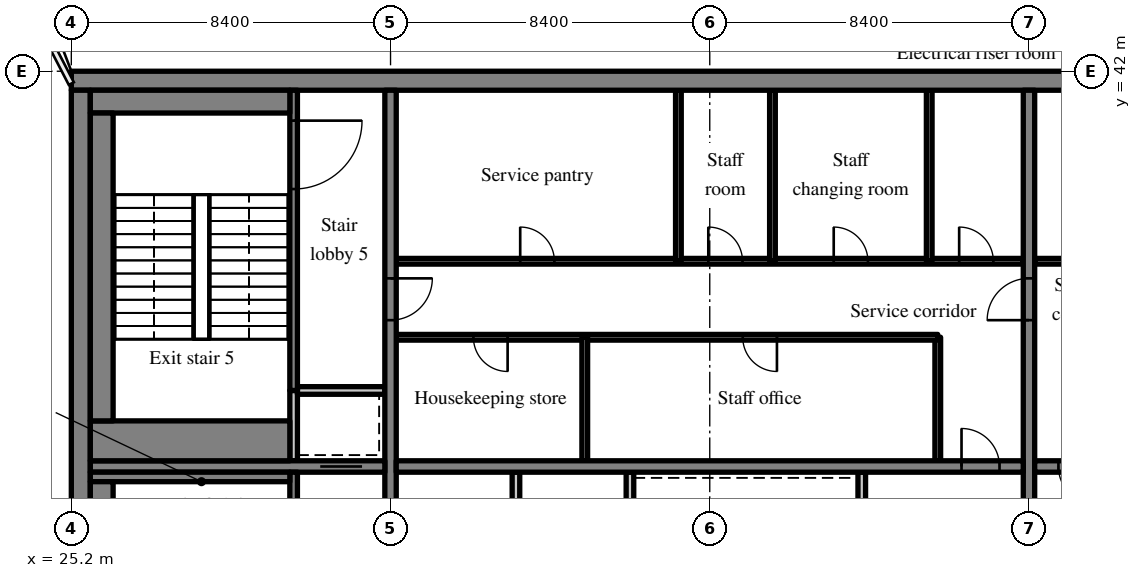
"""IFC4 building model, lengths in metres.
Left out: names, types, materials, properties, quantities, classifications, styles, units other than length and angle.
Written with IfcOpenShell. Run it as: python <this file> out.ifc"""

import sys

from ifc_helpers import new_model, si_unit, direction, frame, frame_2d, origin, place, context, subcontext, project, spatial, rectangle, extrude, source, transform, mapped, element, fill, save


model = new_model("IFC4")
c1 = context("Model", 3, precision=1e-05, world=origin(), true_north=direction((0.0, 1.0)))
c2 = subcontext(c1, "Body", "Model", "MODEL_VIEW")
j1 = project(units=[si_unit("LENGTHUNIT", "METRE"), si_unit("PLANEANGLEUNIT", "RADIAN")], contexts=[c1])
p1 = place(None, origin())
s1 = spatial("IfcSite", under=j1, at=p1, CompositionType="ELEMENT")
p2 = place(p1, origin())
s2 = spatial("IfcBuilding", under=s1, at=p2, CompositionType="ELEMENT")
p3 = place(p2, frame((0.0, 0.0, 323.7)))
s3 = spatial("IfcBuildingStorey", under=s2, at=p3, CompositionType="ELEMENT", Elevation=323.7)
m1 = source(origin(), c2, "Body", "SweptSolid", [
    extrude(rectangle(XDim=50.4, YDim=0.5, at=frame_2d((25.2, 0.0))), origin(), (0.0, 0.0, 1.0), 5.72),
])
p4 = place(p3, frame((25.2, 41.75, 0.0), z_axis=(0.0, 0.0, 1.0), x_axis=(1.0, 0.0, 0.0)))
e1 = element("IfcWall", 1, at=p4, inside=s3, PredefinedType="SHEAR", context=c2, shape_type="MappedRepresentation", body=[
    mapped(m1, transform((0.0, 0.0, 0.0), scale=1.0)),
])
m2 = source(origin(), c2, "Body", "SweptSolid", [
    extrude(rectangle(XDim=19.0, YDim=0.5, at=frame_2d((9.5, 0.0))), origin(), (0.0, 0.0, 1.0), 5.72),
])
p5 = place(p3, frame((25.45, 22.5, 0.0), z_axis=(0.0, 0.0, 1.0), x_axis=(0.0, 1.0, 0.0)))
e2 = element("IfcWall", 2, at=p5, inside=s3, PredefinedType="SHEAR", context=c2, shape_type="MappedRepresentation", body=[
    mapped(m2, transform((0.0, 0.0, 0.0), scale=1.0)),
])
m3 = source(origin(), c2, "Body", "SweptSolid", [
    extrude(rectangle(XDim=19.0, YDim=0.3, at=frame_2d((9.5, 0.0))), origin(), (0.0, 0.0, 1.0), 5.72),
])
p6 = place(p3, frame((33.6, 22.5, 0.0), z_axis=(0.0, 0.0, 1.0), x_axis=(0.0, 1.0, 0.0)))
e3 = element("IfcWall", 3, at=p6, inside=s3, PredefinedType="SHEAR", context=c2, shape_type="MappedRepresentation", body=[
    mapped(m3, transform((0.0, 0.0, 0.0), scale=1.0)),
])
m4 = source(origin(), c2, "Body", "SweptSolid", [
    extrude(rectangle(XDim=1.1, YDim=2.1, at=frame_2d((0.55, 1.05))), frame((0.0, 0.16, 0.0), z_axis=(0.0, -1.0, 0.0), x_axis=(1.0, 0.0, 0.0)), (0.0, 0.0, 1.0), 0.32),
])
p7 = place(p6, frame((12.95, 0.0, 0.0)))
e4 = element("IfcOpeningElement", 4, at=p7, cuts=e3, PredefinedType="OPENING", context=c2, shape_type="MappedRepresentation", body=[
    mapped(m4, transform((0.0, 0.0, 0.0), scale=1.0)),
])
p8 = place(p3, frame((50.4, 22.5, 0.0), z_axis=(0.0, 0.0, 1.0), x_axis=(0.0, 1.0, 0.0)))
e5 = element("IfcWall", 5, at=p8, inside=s3, PredefinedType="SHEAR", context=c2, shape_type="MappedRepresentation", body=[
    mapped(m3, transform((0.0, 0.0, 0.0), scale=1.0)),
])
p9 = place(p8, frame((12.95, 0.0, 0.0)))
e6 = element("IfcOpeningElement", 6, at=p9, cuts=e5, PredefinedType="OPENING", context=c2, shape_type="MappedRepresentation", body=[
    mapped(m4, transform((0.0, 0.0, 0.0), scale=1.0)),
])
m5 = source(origin(), c2, "Body", "SweptSolid", [
    extrude(rectangle(XDim=7.75, YDim=0.3, at=frame_2d((3.875, 0.0))), origin(), (0.0, 0.0, 1.0), 5.72),
])
p10 = place(p3, frame((25.7, 31.6, 0.0), z_axis=(0.0, 0.0, 1.0), x_axis=(1.0, 0.0, 0.0)))
e7 = element("IfcWall", 7, at=p10, inside=s3, PredefinedType="SHEAR", context=c2, shape_type="MappedRepresentation", body=[
    mapped(m5, transform((0.0, 0.0, 0.0), scale=1.0)),
])
p11 = place(p10, frame((6.05, 0.0, 0.0)))
e8 = element("IfcOpeningElement", 8, at=p11, cuts=e7, PredefinedType="OPENING", context=c2, shape_type="MappedRepresentation", body=[
    mapped(m4, transform((0.0, 0.0, 0.0), scale=1.0)),
])
m6 = source(origin(), c2, "Body", "SweptSolid", [
    extrude(rectangle(XDim=16.5, YDim=0.3, at=frame_2d((8.25, 0.0))), origin(), (0.0, 0.0, 1.0), 5.72),
])
p12 = place(p3, frame((33.75, 31.6, 0.0), z_axis=(0.0, 0.0, 1.0), x_axis=(1.0, 0.0, 0.0)))
e9 = element("IfcWall", 9, at=p12, inside=s3, PredefinedType="SHEAR", context=c2, shape_type="MappedRepresentation", body=[
    mapped(m6, transform((0.0, 0.0, 0.0), scale=1.0)),
])
m7 = source(origin(), c2, "Body", "SweptSolid", [
    extrude(rectangle(XDim=1.0, YDim=2.1, at=frame_2d((0.5, 1.05))), frame((0.0, 0.16, 0.0), z_axis=(0.0, -1.0, 0.0), x_axis=(1.0, 0.0, 0.0)), (0.0, 0.0, 1.0), 0.32),
])
p13 = place(p12, frame((14.875, 0.0, 0.0)))
e10 = element("IfcOpeningElement", 10, at=p13, cuts=e9, PredefinedType="OPENING", context=c2, shape_type="MappedRepresentation", body=[
    mapped(m7, transform((0.0, 0.0, 0.0), scale=1.0)),
])
p14 = place(p3, frame((50.55, 31.6, 0.0), z_axis=(0.0, 0.0, 1.0), x_axis=(1.0, 0.0, 0.0)))
e11 = element("IfcWall", 11, at=p14, inside=s3, PredefinedType="SHEAR", context=c2, shape_type="MappedRepresentation", body=[
    mapped(m6, transform((0.0, 0.0, 0.0), scale=1.0)),
])
p15 = place(p14, frame((0.625, 0.0, 0.0)))
e12 = element("IfcOpeningElement", 12, at=p15, cuts=e11, PredefinedType="OPENING", context=c2, shape_type="MappedRepresentation", body=[
    mapped(m7, transform((0.0, 0.0, 0.0), scale=1.0)),
])
m8 = source(origin(), c2, "Body", "SweptSolid", [
    extrude(rectangle(XDim=8.95, YDim=0.2, at=frame_2d((4.475, 0.0))), origin(), (0.0, 0.0, 1.0), 5.72),
])
p16 = place(p3, frame((39.9, 22.5, 0.0), z_axis=(0.0, 0.0, 1.0), x_axis=(0.0, 1.0, 0.0)))
e13 = element("IfcWall", 13, at=p16, inside=s3, PredefinedType="PARTITIONING", context=c2, shape_type="MappedRepresentation", body=[
    mapped(m8, transform((0.0, 0.0, 0.0), scale=1.0)),
])
m9 = source(origin(), c2, "Body", "SweptSolid", [
    extrude(rectangle(XDim=0.9, YDim=2.1, at=frame_2d((0.45, 1.05))), frame((0.0, 0.11, 0.0), z_axis=(0.0, -1.0, 0.0), x_axis=(1.0, 0.0, 0.0)), (0.0, 0.0, 1.0), 0.22),
])
p17 = place(p16, frame((4.05, 0.0, 0.0)))
e14 = element("IfcOpeningElement", 14, at=p17, cuts=e13, PredefinedType="OPENING", context=c2, shape_type="MappedRepresentation", body=[
    mapped(m9, transform((0.0, 0.0, 0.0), scale=1.0)),
])
m10 = source(origin(), c2, "Body", "SweptSolid", [
    extrude(rectangle(XDim=2.65, YDim=0.2, at=frame_2d((1.325, 0.0))), origin(), (0.0, 0.0, 1.0), 5.72),
])
p18 = place(p3, frame((46.0, 28.8, 0.0), z_axis=(0.0, 0.0, 1.0), x_axis=(0.0, 1.0, 0.0)))
e15 = element("IfcWall", 15, at=p18, inside=s3, PredefinedType="SOLIDWALL", context=c2, shape_type="MappedRepresentation", body=[
    mapped(m10, transform((0.0, 0.0, 0.0), scale=1.0)),
])
p19 = place(p3, frame((36.9, 22.5, 0.0), z_axis=(0.0, 0.0, 1.0), x_axis=(0.0, 1.0, 0.0)))
e16 = element("IfcWall", 16, at=p19, inside=s3, PredefinedType="PARTITIONING", context=c2, shape_type="MappedRepresentation", body=[
    mapped(m8, transform((0.0, 0.0, 0.0), scale=1.0)),
])
m11 = source(origin(), c2, "Body", "SweptSolid", [
    extrude(rectangle(XDim=3.25, YDim=0.15, at=frame_2d((1.625, 0.0))), origin(), (0.0, 0.0, 1.0), 5.72),
])
p20 = place(p3, frame((48.0, 31.75, 0.0), z_axis=(0.0, 0.0, 1.0), x_axis=(0.0, 1.0, 0.0)))
e17 = element("IfcWall", 17, at=p20, inside=s3, PredefinedType="PARTITIONING", context=c2, shape_type="MappedRepresentation", body=[
    mapped(m11, transform((0.0, 0.0, 0.0), scale=1.0)),
])
m12 = source(origin(), c2, "Body", "SweptSolid", [
    extrude(rectangle(XDim=14.25, YDim=0.15, at=frame_2d((7.125, 0.0))), origin(), (0.0, 0.0, 1.0), 5.72),
])
p21 = place(p3, frame((33.75, 35.0, 0.0), z_axis=(0.0, 0.0, 1.0), x_axis=(1.0, 0.0, 0.0)))
e18 = element("IfcWall", 18, at=p21, inside=s3, PredefinedType="PARTITIONING", context=c2, shape_type="MappedRepresentation", body=[
    mapped(m12, transform((0.0, 0.0, 0.0), scale=1.0)),
])
m13 = source(origin(), c2, "Body", "SweptSolid", [
    extrude(rectangle(XDim=0.9, YDim=2.1, at=frame_2d((0.45, 1.05))), frame((0.0, 0.085, 0.0), z_axis=(0.0, -1.0, 0.0), x_axis=(1.0, 0.0, 0.0)), (0.0, 0.0, 1.0), 0.17),
])
p22 = place(p21, frame((2.031, 0.0, 0.0)))
e19 = element("IfcOpeningElement", 19, at=p22, cuts=e18, PredefinedType="OPENING", context=c2, shape_type="MappedRepresentation", body=[
    mapped(m13, transform((0.0, 0.0, 0.0), scale=1.0)),
])
p23 = place(p21, frame((9.118, 0.0, 0.0)))
e20 = element("IfcOpeningElement", 20, at=p23, cuts=e18, PredefinedType="OPENING", context=c2, shape_type="MappedRepresentation", body=[
    mapped(m13, transform((0.0, 0.0, 0.0), scale=1.0)),
])
m14 = source(origin(), c2, "Body", "SweptSolid", [
    extrude(rectangle(XDim=16.5, YDim=0.15, at=frame_2d((8.25, 0.0))), origin(), (0.0, 0.0, 1.0), 5.72),
])
p24 = place(p3, frame((33.75, 37.0, 0.0), z_axis=(0.0, 0.0, 1.0), x_axis=(1.0, 0.0, 0.0)))
e21 = element("IfcWall", 21, at=p24, inside=s3, PredefinedType="PARTITIONING", context=c2, shape_type="MappedRepresentation", body=[
    mapped(m14, transform((0.0, 0.0, 0.0), scale=1.0)),
])
p25 = place(p24, frame((3.262, 0.0, 0.0)))
e22 = element("IfcOpeningElement", 22, at=p25, cuts=e21, PredefinedType="OPENING", context=c2, shape_type="MappedRepresentation", body=[
    mapped(m13, transform((0.0, 0.0, 0.0), scale=1.0)),
])
p26 = place(p24, frame((8.212, 0.0, 0.0)))
e23 = element("IfcOpeningElement", 23, at=p26, cuts=e21, PredefinedType="OPENING", context=c2, shape_type="MappedRepresentation", body=[
    mapped(m13, transform((0.0, 0.0, 0.0), scale=1.0)),
])
p27 = place(p24, frame((11.512, 0.0, 0.0)))
e24 = element("IfcOpeningElement", 24, at=p27, cuts=e21, PredefinedType="OPENING", context=c2, shape_type="MappedRepresentation", body=[
    mapped(m13, transform((0.0, 0.0, 0.0), scale=1.0)),
])
p28 = place(p24, frame((14.813, 0.0, 0.0)))
e25 = element("IfcOpeningElement", 25, at=p28, cuts=e21, PredefinedType="OPENING", context=c2, shape_type="MappedRepresentation", body=[
    mapped(m13, transform((0.0, 0.0, 0.0), scale=1.0)),
])
p29 = place(p3, frame((38.711, 31.75, 0.0), z_axis=(0.0, 0.0, 1.0), x_axis=(0.0, 1.0, 0.0)))
e26 = element("IfcWall", 26, at=p29, inside=s3, PredefinedType="PARTITIONING", context=c2, shape_type="MappedRepresentation", body=[
    mapped(m11, transform((0.0, 0.0, 0.0), scale=1.0)),
])
m15 = source(origin(), c2, "Body", "SweptSolid", [
    extrude(rectangle(XDim=4.5, YDim=0.15, at=frame_2d((2.25, 0.0))), origin(), (0.0, 0.0, 1.0), 5.72),
])
for number, where, z_axis, x_axis in (
    (27, (41.175, 37.0, 0.0), (0.0, 0.0, 1.0), (0.0, 1.0, 0.0)),
    (28, (43.65, 37.0, 0.0), (0.0, 0.0, 1.0), (0.0, 1.0, 0.0)),
    (29, (47.775, 37.0, 0.0), (0.0, 0.0, 1.0), (0.0, 1.0, 0.0)),
):
    element("IfcWall", number, at=place(p3, frame(where, z_axis=z_axis, x_axis=x_axis)), inside=s3, PredefinedType="PARTITIONING", context=c2, shape_type="MappedRepresentation", body=[
        mapped(m15, transform((0.0, 0.0, 0.0), scale=1.0)),
    ])
p30 = place(p3, frame((67.05, 37.0, 0.0), z_axis=(0.0, 0.0, 1.0), x_axis=(-1.0, 0.0, 0.0)))
e30 = element("IfcWall", 30, at=p30, inside=s3, PredefinedType="PARTITIONING", context=c2, shape_type="MappedRepresentation", body=[
    mapped(m14, transform((0.0, 0.0, 0.0), scale=1.0)),
])
p31 = place(p30, frame((0.788, 0.0, 0.0)))
e31 = element("IfcOpeningElement", 31, at=p31, cuts=e30, PredefinedType="OPENING", context=c2, shape_type="MappedRepresentation", body=[
    mapped(m13, transform((0.0, 0.0, 0.0), scale=1.0)),
])
p32 = place(p30, frame((3.675, 0.0, 0.0)))
e32 = element("IfcOpeningElement", 32, at=p32, cuts=e30, PredefinedType="OPENING", context=c2, shape_type="MappedRepresentation", body=[
    mapped(m13, transform((0.0, 0.0, 0.0), scale=1.0)),
])
p33 = place(p30, frame((9.45, 0.0, 0.0)))
e33 = element("IfcOpeningElement", 33, at=p33, cuts=e30, PredefinedType="OPENING", context=c2, shape_type="MappedRepresentation", body=[
    mapped(m13, transform((0.0, 0.0, 0.0), scale=1.0)),
])
p34 = place(p30, frame((14.813, 0.0, 0.0)))
e34 = element("IfcOpeningElement", 34, at=p34, cuts=e30, PredefinedType="OPENING", context=c2, shape_type="MappedRepresentation", body=[
    mapped(m13, transform((0.0, 0.0, 0.0), scale=1.0)),
])
m16 = source(origin(), c2, "Body", "SweptSolid", [
    extrude(rectangle(XDim=8.95, YDim=0.2, at=frame_2d((4.475, 0.0))), origin(), (0.0, 0.0, 1.0), 5.72),
])
p35 = place(p3, frame((31.05, 22.5, 0.0), z_axis=(0.0, 0.0, 1.0), x_axis=(0.0, 1.0, 0.0)))
e35 = element("IfcWall", 35, at=p35, inside=s3, PredefinedType="SOLIDWALL", context=c2, shape_type="MappedRepresentation", body=[
    mapped(m16, transform((0.0, 0.0, 0.0), scale=1.0)),
])
m17 = source(origin(), c2, "Body", "SweptSolid", [
    extrude(rectangle(XDim=1.2, YDim=2.1, at=frame_2d((0.6, 1.05))), frame((0.0, 0.11, 0.0), z_axis=(0.0, -1.0, 0.0), x_axis=(1.0, 0.0, 0.0)), (0.0, 0.0, 1.0), 0.22),
])
p36 = place(p35, frame((7.0, 0.0, 0.0)))
e36 = element("IfcOpeningElement", 36, at=p36, cuts=e35, PredefinedType="OPENING", context=c2, shape_type="MappedRepresentation", body=[
    mapped(m17, transform((0.0, 0.0, 0.0), scale=1.0)),
])
m18 = source(origin(), c2, "Body", "SweptSolid", [
    extrude(rectangle(XDim=1.85, YDim=0.2, at=frame_2d((0.925, 0.0))), origin(), (0.0, 0.0, 1.0), 5.72),
])
p37 = place(p3, frame((31.05, 31.75, 0.0), z_axis=(0.0, 0.0, 1.0), x_axis=(0.0, 1.0, 0.0)))
e37 = element("IfcWall", 37, at=p37, inside=s3, PredefinedType="SOLIDWALL", context=c2, shape_type="MappedRepresentation", body=[
    mapped(m18, transform((0.0, 0.0, 0.0), scale=1.0)),
])
m19 = source(origin(), c2, "Body", "SweptSolid", [
    extrude(rectangle(XDim=2.3, YDim=0.2, at=frame_2d((1.15, 0.0))), origin(), (0.0, 0.0, 1.0), 5.72),
])
p38 = place(p3, frame((31.15, 33.6, 0.0), z_axis=(0.0, 0.0, 1.0), x_axis=(1.0, 0.0, 0.0)))
e38 = element("IfcWall", 38, at=p38, inside=s3, PredefinedType="SOLIDWALL", context=c2, shape_type="MappedRepresentation", body=[
    mapped(m19, transform((0.0, 0.0, 0.0), scale=1.0)),
])
m20 = source(origin(), c2, "Body", "SweptSolid", [
    extrude(rectangle(XDim=7.9, YDim=0.2, at=frame_2d((3.95, 0.0))), origin(), (0.0, 0.0, 1.0), 5.72),
])
p39 = place(p3, frame((31.05, 33.6, 0.0), z_axis=(0.0, 0.0, 1.0), x_axis=(0.0, 1.0, 0.0)))
e39 = element("IfcWall", 39, at=p39, inside=s3, PredefinedType="SOLIDWALL", context=c2, shape_type="MappedRepresentation", body=[
    mapped(m20, transform((0.0, 0.0, 0.0), scale=1.0)),
])
m21 = source(origin(), c2, "Body", "SweptSolid", [
    extrude(rectangle(XDim=1.8, YDim=2.1, at=frame_2d((0.9, 1.05))), frame((0.0, 0.11, 0.0), z_axis=(0.0, -1.0, 0.0), x_axis=(1.0, 0.0, 0.0)), (0.0, 0.0, 1.0), 0.22),
])
p40 = place(p39, frame((5.3, 0.0, 0.0)))
e40 = element("IfcOpeningElement", 40, at=p40, cuts=e39, PredefinedType="OPENING", context=c2, shape_type="MappedRepresentation", body=[
    mapped(m21, transform((0.0, 0.0, 0.0), scale=1.0)),
])
m22 = source(origin(), c2, "Body", "SweptSolid", [
    extrude(rectangle(XDim=5.25, YDim=0.25, at=frame_2d((2.625, 0.0))), origin(), (0.0, 0.0, 1.0), 5.72),
])
p41 = place(p3, frame((25.7, 31.325, 0.0), z_axis=(0.0, 0.0, 1.0), x_axis=(1.0, 0.0, 0.0)))
e41 = element("IfcWall", 41, at=p41, inside=s3, PredefinedType="SOLIDWALL", context=c2, shape_type="MappedRepresentation", body=[
    mapped(m22, transform((0.0, 0.0, 0.0), scale=1.0)),
])
m23 = source(origin(), c2, "Body", "SweptSolid", [
    extrude(rectangle(XDim=8.1, YDim=0.6, at=frame_2d((4.05, 0.0))), origin(), (0.0, 0.0, 1.0), 5.72),
])
p42 = place(p3, frame((26.0, 23.1, 0.0), z_axis=(0.0, 0.0, 1.0), x_axis=(0.0, 1.0, 0.0)))
e42 = element("IfcWall", 42, at=p42, inside=s3, PredefinedType="SOLIDWALL", context=c2, shape_type="MappedRepresentation", body=[
    mapped(m23, transform((0.0, 0.0, 0.0), scale=1.0)),
])
m24 = source(origin(), c2, "Body", "SweptSolid", [
    extrude(rectangle(XDim=5.25, YDim=0.6, at=frame_2d((2.625, 0.0))), origin(), (0.0, 0.0, 1.0), 5.72),
])
p43 = place(p3, frame((25.7, 41.2, 0.0), z_axis=(0.0, 0.0, 1.0), x_axis=(1.0, 0.0, 0.0)))
e43 = element("IfcWall", 43, at=p43, inside=s3, PredefinedType="SOLIDWALL", context=c2, shape_type="MappedRepresentation", body=[
    mapped(m24, transform((0.0, 0.0, 0.0), scale=1.0)),
])
m25 = source(origin(), c2, "Body", "SweptSolid", [
    extrude(rectangle(XDim=5.25, YDim=1.05, at=frame_2d((2.625, 0.0))), origin(), (0.0, 0.0, 1.0), 5.72),
])
p44 = place(p3, frame((25.7, 32.275, 0.0), z_axis=(0.0, 0.0, 1.0), x_axis=(1.0, 0.0, 0.0)))
e44 = element("IfcWall", 44, at=p44, inside=s3, PredefinedType="SOLIDWALL", context=c2, shape_type="MappedRepresentation", body=[
    mapped(m25, transform((0.0, 0.0, 0.0), scale=1.0)),
])
p45 = place(p3, frame((26.0, 32.8, 0.0), z_axis=(0.0, 0.0, 1.0), x_axis=(0.0, 1.0, 0.0)))
e45 = element("IfcWall", 45, at=p45, inside=s3, PredefinedType="SOLIDWALL", context=c2, shape_type="MappedRepresentation", body=[
    mapped(m23, transform((0.0, 0.0, 0.0), scale=1.0)),
])
m26 = source(origin(), c2, "Body", "SweptSolid", [
    extrude(rectangle(XDim=1.0, YDim=2.1, at=frame_2d((0.5, 1.05))), frame((0.0, 0.025, 0.0), z_axis=(0.0, -1.0, 0.0), x_axis=(1.0, 0.0, 0.0)), (0.0, 0.0, 1.0), 0.05),
])
p46 = place(p13, origin())
e46 = element("IfcDoor", 46, at=p46, inside=s3, OperationType="SINGLE_SWING_LEFT", PredefinedType="DOOR", context=c2, shape_type="MappedRepresentation", body=[
    mapped(m26, transform((0.0, 0.0, 0.0), scale=1.0)),
])
fill(e10, e46)
m27 = source(origin(), c2, "Body", "SweptSolid", [
    extrude(rectangle(XDim=0.9, YDim=2.1, at=frame_2d((0.45, 1.05))), frame((0.0, 0.025, 0.0), z_axis=(0.0, -1.0, 0.0), x_axis=(1.0, 0.0, 0.0)), (0.0, 0.0, 1.0), 0.05),
])
p47 = place(p22, origin())
e47 = element("IfcDoor", 47, at=p47, inside=s3, OperationType="SINGLE_SWING_RIGHT", PredefinedType="DOOR", context=c2, shape_type="MappedRepresentation", body=[
    mapped(m27, transform((0.0, 0.0, 0.0), scale=1.0)),
])
fill(e19, e47)
p48 = place(p23, origin())
e48 = element("IfcDoor", 48, at=p48, inside=s3, OperationType="SINGLE_SWING_RIGHT", PredefinedType="DOOR", context=c2, shape_type="MappedRepresentation", body=[
    mapped(m27, transform((0.0, 0.0, 0.0), scale=1.0)),
])
fill(e20, e48)
p49 = place(p25, origin())
e49 = element("IfcDoor", 49, at=p49, inside=s3, OperationType="SINGLE_SWING_LEFT", PredefinedType="DOOR", context=c2, shape_type="MappedRepresentation", body=[
    mapped(m27, transform((0.0, 0.0, 0.0), scale=1.0)),
])
fill(e22, e49)
p50 = place(p26, origin())
e50 = element("IfcDoor", 50, at=p50, inside=s3, OperationType="SINGLE_SWING_LEFT", PredefinedType="DOOR", context=c2, shape_type="MappedRepresentation", body=[
    mapped(m27, transform((0.0, 0.0, 0.0), scale=1.0)),
])
fill(e23, e50)
p51 = place(p27, origin())
e51 = element("IfcDoor", 51, at=p51, inside=s3, OperationType="SINGLE_SWING_LEFT", PredefinedType="DOOR", context=c2, shape_type="MappedRepresentation", body=[
    mapped(m27, transform((0.0, 0.0, 0.0), scale=1.0)),
])
fill(e24, e51)
p52 = place(p28, origin())
e52 = element("IfcDoor", 52, at=p52, inside=s3, OperationType="SINGLE_SWING_LEFT", PredefinedType="DOOR", context=c2, shape_type="MappedRepresentation", body=[
    mapped(m27, transform((0.0, 0.0, 0.0), scale=1.0)),
])
fill(e25, e52)
p53 = place(p15, origin())
e53 = element("IfcDoor", 53, at=p53, inside=s3, OperationType="SINGLE_SWING_RIGHT", PredefinedType="DOOR", context=c2, shape_type="MappedRepresentation", body=[
    mapped(m26, transform((0.0, 0.0, 0.0), scale=1.0)),
])
fill(e12, e53)
m28 = source(origin(), c2, "Body", "SweptSolid", [
    extrude(rectangle(XDim=1.1, YDim=2.1, at=frame_2d((0.55, 1.05))), frame((0.0, 0.025, 0.0), z_axis=(0.0, -1.0, 0.0), x_axis=(1.0, 0.0, 0.0)), (0.0, 0.0, 1.0), 0.05),
])
p54 = place(p11, origin())
e54 = element("IfcDoor", 54, at=p54, inside=s3, OperationType="SLIDING_TO_LEFT", PredefinedType="DOOR", context=c2, shape_type="MappedRepresentation", body=[
    mapped(m28, transform((0.0, 0.0, 0.0), scale=1.0)),
])
fill(e8, e54)
m29 = source(origin(), c2, "Body", "SweptSolid", [
    extrude(rectangle(XDim=1.8, YDim=2.1, at=frame_2d((0.9, 1.05))), frame((0.0, 0.025, 0.0), z_axis=(0.0, -1.0, 0.0), x_axis=(1.0, 0.0, 0.0)), (0.0, 0.0, 1.0), 0.05),
])
p55 = place(p40, origin())
e55 = element("IfcDoor", 55, at=p55, inside=s3, OperationType="SINGLE_SWING_RIGHT", PredefinedType="DOOR", context=c2, shape_type="MappedRepresentation", body=[
    mapped(m29, transform((0.0, 0.0, 0.0), scale=1.0)),
])
fill(e40, e55)
p56 = place(p7, origin())
e56 = element("IfcDoor", 56, at=p56, inside=s3, OperationType="SINGLE_SWING_RIGHT", PredefinedType="DOOR", context=c2, shape_type="MappedRepresentation", body=[
    mapped(m28, transform((0.0, 0.0, 0.0), scale=1.0)),
])
fill(e4, e56)
p57 = place(p9, origin())
e57 = element("IfcDoor", 57, at=p57, inside=s3, OperationType="SINGLE_SWING_LEFT", PredefinedType="DOOR", context=c2, shape_type="MappedRepresentation", body=[
    mapped(m28, transform((0.0, 0.0, 0.0), scale=1.0)),
])
fill(e6, e57)
save(model, sys.argv[1])
